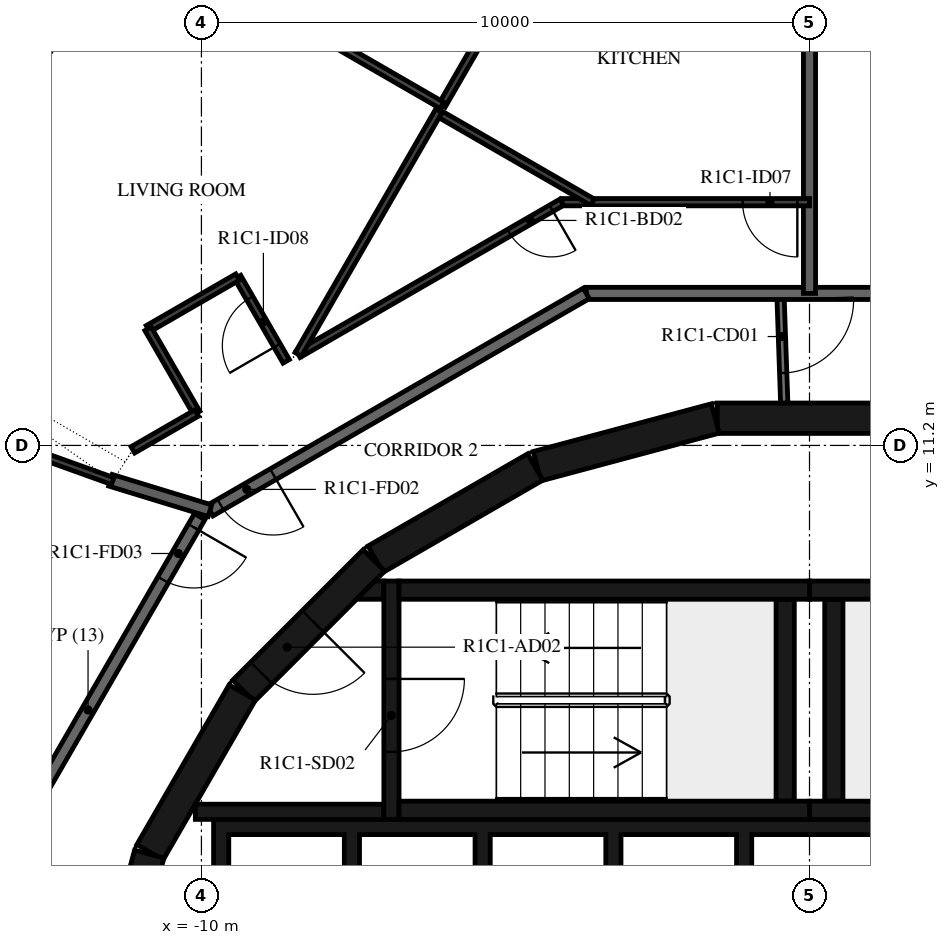
"""IFC4 building model, lengths in metres.
Left out: names, types, materials, properties, quantities, classifications, styles, units other than length and angle.
Written with IfcOpenShell. Run it as: python <this file> out.ifc"""

import sys

from ifc_helpers import new_model, si_unit, direction, frame, frame_2d, origin, place, context, subcontext, project, spatial, polyline, rectangle, outline, extrude, element, fill, save


model = new_model("IFC4")
c1 = context("Model", 3, precision=1e-05, world=origin(), true_north=direction((0.0, 1.0)))
c2 = subcontext(c1, "Body", "Model", "MODEL_VIEW")
j1 = project(units=[si_unit("LENGTHUNIT", "METRE"), si_unit("PLANEANGLEUNIT", "RADIAN")], contexts=[c1])
p1 = place(None, origin())
s1 = spatial("IfcSite", under=j1, at=p1, CompositionType="ELEMENT")
p2 = place(p1, origin())
s2 = spatial("IfcBuilding", under=s1, at=p2, CompositionType="ELEMENT")
p3 = place(p2, frame((0.0, 0.0, 62.9)))
s3 = spatial("IfcBuildingStorey", under=s2, at=p3, CompositionType="ELEMENT", Elevation=62.9)
for number, where, z_axis, x_axis in (
    (1, (1.516, 11.647, 0.0), (0.0, 0.0, 1.0), (-1.0, 0.0, 0.0)),
    (2, (-1.55, 11.643, 0.0), (0.0, 0.0, 1.0), (-0.966, -0.259, 0.0)),
    (3, (-4.51, 10.845, 0.0), (0.0, 0.0, 1.0), (-0.866, -0.5, 0.0)),
):
    element("IfcWall", number, at=place(p3, frame(where, z_axis=z_axis, x_axis=x_axis)), inside=s3, PredefinedType="SHEAR", context=c2, shape_type="SweptSolid", body=[
        extrude(rectangle(XDim=3.033, YDim=0.5, at=frame_2d((1.516, 0.0))), origin(), (0.0, 0.0, 1.0), 3.12),
    ])
p4 = place(p3, frame((-7.164, 9.308, 0.0), z_axis=(0.0, 0.0, 1.0), x_axis=(-0.707106781187, -0.707106781187, 0.0)))
e4 = element("IfcWall", 4, at=p4, inside=s3, PredefinedType="SHEAR", context=c2, shape_type="SweptSolid", body=[
    extrude(rectangle(XDim=3.032, YDim=0.5, at=frame_2d((1.516, 0.0))), origin(), (0.0, 0.0, 1.0), 3.12),
])
p5 = place(p4, frame((1.416, 0.0, 0.0)))
e5 = element("IfcOpeningElement", 5, at=p5, cuts=e4, PredefinedType="OPENING", context=c2, shape_type="SweptSolid", body=[
    extrude(rectangle(XDim=1.2, YDim=2.1, at=frame_2d((0.6, 1.05))), frame((0.0, 0.26, 0.0), z_axis=(0.0, -1.0, 0.0), x_axis=(1.0, 0.0, 0.0)), (0.0, 0.0, 1.0), 0.52),
])
for number, where, z_axis, x_axis in (
    (6, (-9.329, 7.137, 0.0), (0.0, 0.0, 1.0), (-0.5, -0.866, 0.0)),
    (7, (-10.858, 4.479, 0.0), (0.0, 0.0, 1.0), (-0.259, -0.966, 0.0)),
):
    element("IfcWall", number, at=place(p3, frame(where, z_axis=z_axis, x_axis=x_axis)), inside=s3, PredefinedType="SHEAR", context=c2, shape_type="SweptSolid", body=[
        extrude(rectangle(XDim=3.033, YDim=0.5, at=frame_2d((1.516, 0.0))), origin(), (0.0, 0.0, 1.0), 3.12),
    ])
for number, where, z_axis, x_axis in (
    (8, (0.0, 5.2, 0.0), (0.0, 0.0, 1.0), (1.0, 0.0, 0.0)),
    (9, (0.0, 8.82, 0.0), (0.0, 0.0, 1.0), (1.0, 0.0, 0.0)),
):
    element("IfcWall", number, at=place(p3, frame(where, z_axis=z_axis, x_axis=x_axis)), inside=s3, PredefinedType="SHEAR", context=c2, shape_type="SweptSolid", body=[
        extrude(rectangle(XDim=6.75, YDim=0.3, at=frame_2d((3.375, 0.0))), origin(), (0.0, 0.0, 1.0), 3.12),
    ])
p6 = place(p3, frame((0.4, 5.35, 0.0), z_axis=(0.0, 0.0, 1.0), x_axis=(0.0, 1.0, 0.0)))
e10 = element("IfcWall", 10, at=p6, inside=s3, PredefinedType="SHEAR", context=c2, shape_type="SweptSolid", body=[
    extrude(rectangle(XDim=3.32, YDim=0.3, at=frame_2d((1.66, 0.0))), origin(), (0.0, 0.0, 1.0), 3.12),
])
for number, where, z_axis, x_axis in (
    (11, (-6.75, 5.2, 0.0), (0.0, 0.0, 1.0), (1.0, 0.0, 0.0)),
    (12, (-6.75, 8.82, 0.0), (0.0, 0.0, 1.0), (1.0, 0.0, 0.0)),
):
    element("IfcWall", number, at=place(p3, frame(where, z_axis=z_axis, x_axis=x_axis)), inside=s3, PredefinedType="SHEAR", context=c2, shape_type="SweptSolid", body=[
        extrude(rectangle(XDim=6.75, YDim=0.3, at=frame_2d((3.375, 0.0))), origin(), (0.0, 0.0, 1.0), 3.12),
    ])
p7 = place(p3, frame((-0.4, 5.35, 0.0), z_axis=(0.0, 0.0, 1.0), x_axis=(0.0, 1.0, 0.0)))
e13 = element("IfcWall", 13, at=p7, inside=s3, PredefinedType="SHEAR", context=c2, shape_type="SweptSolid", body=[
    extrude(rectangle(XDim=3.32, YDim=0.3, at=frame_2d((1.66, 0.0))), origin(), (0.0, 0.0, 1.0), 3.12),
])
p8 = place(p3, frame((-6.875, 8.97, 0.0), z_axis=(0.0, 0.0, 1.0), x_axis=(0.0, -1.0, 0.0)))
e14 = element("IfcWall", 14, at=p8, inside=s3, PredefinedType="SHEAR", context=c2, shape_type="SweptSolid", body=[
    extrude(rectangle(XDim=3.92, YDim=0.25, at=frame_2d((1.96, 0.0))), origin(), (0.0, 0.0, 1.0), 3.12),
])
p9 = place(p8, frame((1.61, 0.0, 0.0)))
e15 = element("IfcOpeningElement", 15, at=p9, cuts=e14, PredefinedType="OPENING", context=c2, shape_type="SweptSolid", body=[
    extrude(rectangle(XDim=1.2, YDim=2.1, at=frame_2d((0.6, 1.05))), frame((0.0, 0.135, 0.0), z_axis=(0.0, -1.0, 0.0), x_axis=(1.0, 0.0, 0.0)), (0.0, 0.0, 1.0), 0.27),
])
p10 = place(p3, frame((-7.0, 5.175, 0.0), z_axis=(0.0, 0.0, 1.0), x_axis=(-1.0, 0.0, 0.0)))
e16 = element("IfcWall", 16, at=p10, inside=s3, PredefinedType="SHEAR", context=c2, shape_type="SweptSolid", body=[
    extrude(rectangle(XDim=3.1, YDim=0.25, at=frame_2d((1.55, 0.0))), origin(), (0.0, 0.0, 1.0), 3.12),
])
p11 = place(p3, origin())
e17 = element("IfcWall", 17, at=p11, inside=s3, PredefinedType="SHEAR", context=c2, shape_type="SweptSolid", body=[
    extrude(outline(polyline([(-7.148, 8.97), (-7.0, 8.97), (-7.0, 8.67), (-7.448, 8.67), (-7.148, 8.97)])), origin(), (0.0, 0.0, 1.0), 3.12),
])
p12 = place(p3, origin())
e18 = element("IfcWall", 18, at=p12, inside=s3, PredefinedType="SHEAR", context=c2, shape_type="SweptSolid", body=[
    extrude(outline(polyline([(-9.55, 4.8), (-7.65, 4.8), (-7.65, 1.9), (-7.4, 1.9), (-7.4, 4.8), (-5.5, 4.8), (-5.5, 1.9), (-5.25, 1.9), (-5.25, 4.8), (-3.35, 4.8), (-3.35, 1.9), (-3.1, 1.9), (-3.1, 4.8), (-1.2, 4.8), (-1.2, 1.9), (-0.95, 1.9), (-0.95, 4.8), (3.1, 4.8), (3.1, 1.9), (3.35, 1.9), (3.35, 4.8), (5.25, 4.8), (5.25, 1.9), (5.5, 1.9), (5.5, 4.8), (7.4, 4.8), (7.4, 1.9), (7.65, 1.9), (7.65, 4.8), (9.55, 4.8), (9.55, 1.9), (9.8, 1.9), (9.8, 4.8), (9.8, 5.05), (-9.8, 5.05), (-9.8, 4.8), (-9.8, 1.9), (-9.55, 1.9), (-9.55, 4.8)])), origin(), (0.0, 0.0, 1.0), 3.12),
])
p13 = place(p3, frame((-0.479, 13.7, 0.0), z_axis=(0.0, 0.0, 1.0), x_axis=(0.034919103017, -0.999390142159, 0.0)))
e19 = element("IfcWall", 19, at=p13, inside=s3, PredefinedType="PARTITIONING", context=c2, shape_type="SweptSolid", body=[
    extrude(rectangle(XDim=1.804, YDim=0.12, at=frame_2d((0.902, 0.0))), origin(), (0.0, 0.0, 1.0), 3.12),
])
p14 = place(p13, frame((0.11, 0.0, 0.0)))
e20 = element("IfcOpeningElement", 20, at=p14, cuts=e19, PredefinedType="OPENING", context=c2, shape_type="SweptSolid", body=[
    extrude(rectangle(XDim=1.2, YDim=2.1, at=frame_2d((0.6, 1.05))), frame((0.0, 0.07, 0.0), z_axis=(0.0, -1.0, 0.0), x_axis=(1.0, 0.0, 0.0)), (0.0, 0.0, 1.0), 0.14),
])
p15 = place(p3, frame((3.671, 13.7, 0.0), z_axis=(0.0, 0.0, 1.0), x_axis=(-1.0, 0.0, 0.0)))
e21 = element("IfcWall", 21, at=p15, inside=s3, PredefinedType="STANDARD", context=c2, shape_type="SweptSolid", body=[
    extrude(rectangle(XDim=7.342, YDim=0.2, at=frame_2d((3.671, 0.0))), origin(), (0.0, 0.0, 1.0), 3.12),
])
p16 = place(p3, frame((-3.671, 13.7, 0.0), z_axis=(0.0, 0.0, 1.0), x_axis=(-0.866031419417, -0.499989580474, 0.0)))
e22 = element("IfcWall", 22, at=p16, inside=s3, PredefinedType="STANDARD", context=c2, shape_type="SweptSolid", body=[
    extrude(rectangle(XDim=7.147, YDim=0.2, at=frame_2d((3.573, 0.0))), origin(), (0.0, 0.0, 1.0), 3.12),
])
p17 = place(p16, frame((5.947, 0.0, 0.0)))
e23 = element("IfcOpeningElement", 23, at=p17, cuts=e22, PredefinedType="OPENING", context=c2, shape_type="SweptSolid", body=[
    extrude(rectangle(XDim=1.0, YDim=2.1, at=frame_2d((0.5, 1.05))), frame((0.0, 0.11, 0.0), z_axis=(0.0, -1.0, 0.0), x_axis=(1.0, 0.0, 0.0)), (0.0, 0.0, 1.0), 0.22),
])
p18 = place(p3, frame((-10.029, 10.029, 0.0), z_axis=(0.0, 0.0, 1.0), x_axis=(-0.500001669485, -0.866024439905, 0.0)))
e24 = element("IfcWall", 24, at=p18, inside=s3, PredefinedType="STANDARD", context=c2, shape_type="SweptSolid", body=[
    extrude(rectangle(XDim=7.342, YDim=0.2, at=frame_2d((3.671, 0.0))), origin(), (0.0, 0.0, 1.0), 3.12),
])
p19 = place(p18, frame((0.2, 0.0, 0.0)))
e25 = element("IfcOpeningElement", 25, at=p19, cuts=e24, PredefinedType="OPENING", context=c2, shape_type="SweptSolid", body=[
    extrude(rectangle(XDim=1.0, YDim=2.1, at=frame_2d((0.5, 1.05))), frame((0.0, 0.11, 0.0), z_axis=(0.0, -1.0, 0.0), x_axis=(1.0, 0.0, 0.0)), (0.0, 0.0, 1.0), 0.22),
])
p20 = place(p3, frame((0.0, 18.437, 0.0), z_axis=(0.0, 0.0, 1.0), x_axis=(0.0, -1.0, 0.0)))
e26 = element("IfcWall", 26, at=p20, inside=s3, PredefinedType="STANDARD", context=c2, shape_type="SweptSolid", body=[
    extrude(rectangle(XDim=4.737, YDim=0.2, at=frame_2d((2.368, 0.0))), origin(), (0.0, 0.0, 1.0), 3.12),
])
p21 = place(p3, frame((-11.496, 10.627, 0.0), z_axis=(0.0, 0.0, 1.0), x_axis=(0.956240708563, -0.292581112321, 0.0)))
e27 = element("IfcWall", 27, at=p21, inside=s3, PredefinedType="STANDARD", context=c2, shape_type="SweptSolid", body=[
    extrude(rectangle(XDim=1.711, YDim=0.2, at=frame_2d((0.855, 0.0))), origin(), (0.0, 0.0, 1.0), 3.12),
])
p22 = place(p3, frame((0.0, 15.2, 0.0), z_axis=(0.0, 0.0, 1.0), x_axis=(-1.0, 0.0, 0.0)))
e28 = element("IfcWall", 28, at=p22, inside=s3, PredefinedType="PARTITIONING", context=c2, shape_type="SweptSolid", body=[
    extrude(rectangle(XDim=4.073, YDim=0.12, at=frame_2d((2.036, 0.0))), origin(), (0.0, 0.0, 1.0), 3.12),
])
p23 = place(p22, frame((0.2, 0.0, 0.0)))
e29 = element("IfcOpeningElement", 29, at=p23, cuts=e28, PredefinedType="OPENING", context=c2, shape_type="SweptSolid", body=[
    extrude(rectangle(XDim=0.9, YDim=2.1, at=frame_2d((0.45, 1.05))), frame((0.0, 0.07, 0.0), z_axis=(0.0, -1.0, 0.0), x_axis=(1.0, 0.0, 0.0)), (0.0, 0.0, 1.0), 0.14),
])
p24 = place(p3, frame((-4.073, 15.2, 0.0), z_axis=(0.0, 0.0, 1.0), x_axis=(-0.866034514313, -0.499984219769, 0.0)))
e30 = element("IfcWall", 30, at=p24, inside=s3, PredefinedType="PARTITIONING", context=c2, shape_type="SweptSolid", body=[
    extrude(rectangle(XDim=5.006, YDim=0.12, at=frame_2d((2.503, 0.0))), origin(), (0.0, 0.0, 1.0), 3.12),
])
p25 = place(p24, frame((0.2, 0.0, 0.0)))
e31 = element("IfcOpeningElement", 31, at=p25, cuts=e30, PredefinedType="OPENING", context=c2, shape_type="SweptSolid", body=[
    extrude(rectangle(XDim=0.8, YDim=2.1, at=frame_2d((0.4, 1.05))), frame((0.0, 0.07, 0.0), z_axis=(0.0, -1.0, 0.0), x_axis=(1.0, 0.0, 0.0)), (0.0, 0.0, 1.0), 0.14),
])
p26 = place(p3, frame((-8.606, 12.583, 0.0), z_axis=(0.0, 0.0, 1.0), x_axis=(-0.499995408039, 0.866028054938, 0.0)))
e32 = element("IfcWall", 32, at=p26, inside=s3, PredefinedType="PARTITIONING", context=c2, shape_type="SweptSolid", body=[
    extrude(rectangle(XDim=1.6, YDim=0.12, at=frame_2d((0.8, 0.0))), origin(), (0.0, 0.0, 1.0), 3.12),
])
p27 = place(p26, frame((0.3, 0.0, 0.0)))
e33 = element("IfcOpeningElement", 33, at=p27, cuts=e32, PredefinedType="OPENING", context=c2, shape_type="SweptSolid", body=[
    extrude(rectangle(XDim=0.9, YDim=2.1, at=frame_2d((0.45, 1.05))), frame((0.0, 0.07, 0.0), z_axis=(0.0, -1.0, 0.0), x_axis=(1.0, 0.0, 0.0)), (0.0, 0.0, 1.0), 0.14),
])
p28 = place(p3, frame((-9.406, 13.969, 0.0), z_axis=(0.0, 0.0, 1.0), x_axis=(-0.865989465428, -0.500062241894, 0.0)))
e34 = element("IfcWall", 34, at=p28, inside=s3, PredefinedType="PARTITIONING", context=c2, shape_type="SweptSolid", body=[
    extrude(rectangle(XDim=1.7, YDim=0.12, at=frame_2d((0.85, 0.0))), origin(), (0.0, 0.0, 1.0), 3.12),
])
p29 = place(p3, frame((-10.878, 13.118, 0.0), z_axis=(0.0, 0.0, 1.0), x_axis=(0.500061482766, -0.865989903783, 0.0)))
e35 = element("IfcWall", 35, at=p29, inside=s3, PredefinedType="PARTITIONING", context=c2, shape_type="SweptSolid", body=[
    extrude(rectangle(XDim=1.6, YDim=0.12, at=frame_2d((0.8, 0.0))), origin(), (0.0, 0.0, 1.0), 3.12),
])
p30 = place(p3, frame((-10.078, 11.733, 0.0), z_axis=(0.0, 0.0, 1.0), x_axis=(-0.866014416983, -0.500019029215, 0.0)))
e36 = element("IfcWall", 36, at=p30, inside=s3, PredefinedType="PARTITIONING", context=c2, shape_type="SweptSolid", body=[
    extrude(rectangle(XDim=1.211, YDim=0.12, at=frame_2d((0.606, 0.0))), origin(), (0.0, 0.0, 1.0), 3.12),
])
p31 = place(p3, frame((-1.907, 23.957, 0.0), z_axis=(0.0, 0.0, 1.0), x_axis=(-0.499994901178, -0.866028347571, 0.0)))
e37 = element("IfcWall", 37, at=p31, inside=s3, PredefinedType="PARTITIONING", context=c2, shape_type="SweptSolid", body=[
    extrude(rectangle(XDim=8.274, YDim=0.12, at=frame_2d((4.137, 0.0))), origin(), (0.0, 0.0, 1.0), 3.12),
])
p32 = place(p31, frame((4.387, 0.0, 0.0)))
e38 = element("IfcOpeningElement", 38, at=p32, cuts=e37, PredefinedType="OPENING", context=c2, shape_type="SweptSolid", body=[
    extrude(rectangle(XDim=0.9, YDim=2.1, at=frame_2d((0.45, 1.05))), frame((0.0, 0.07, 0.0), z_axis=(0.0, -1.0, 0.0), x_axis=(1.0, 0.0, 0.0)), (0.0, 0.0, 1.0), 0.14),
])
p33 = place(p3, frame((-6.114, 16.67, 0.0), z_axis=(0.0, 0.0, 1.0), x_axis=(0.866011328839, -0.500024377727, 0.0)))
e39 = element("IfcWall", 39, at=p33, inside=s3, PredefinedType="PARTITIONING", context=c2, shape_type="SweptSolid", body=[
    extrude(rectangle(XDim=2.94, YDim=0.12, at=frame_2d((1.47, 0.0))), origin(), (0.0, 0.0, 1.0), 3.12),
])
p34 = place(p3, frame((-11.24, 19.792, 0.0), z_axis=(0.0, 0.0, 1.0), x_axis=(0.866031096941, -0.499990139034, 0.0)))
e40 = element("IfcWall", 40, at=p34, inside=s3, PredefinedType="PARTITIONING", context=c2, shape_type="SweptSolid", body=[
    extrude(rectangle(XDim=6.0, YDim=0.12, at=frame_2d((3.0, 0.0))), origin(), (0.0, 0.0, 1.0), 2.73),
])
p35 = place(p3, frame((-6.094, 16.705, 0.0), z_axis=(0.0, 0.0, 1.0), x_axis=(-0.500014747178, -0.86601688933, 0.0)))
e41 = element("IfcWall", 41, at=p35, inside=s3, PredefinedType="PARTITIONING", context=c2, shape_type="SweptSolid", body=[
    extrude(rectangle(XDim=4.627, YDim=0.12, at=frame_2d((2.313, 0.0))), origin(), (0.0, 0.0, 1.0), 3.12),
])
p36 = place(p3, frame((-11.458, 10.614, 0.0), z_axis=(0.0, 0.0, 1.0), x_axis=(-0.941092440198, 0.338149403375, 0.0)))
e42 = element("IfcWall", 42, at=p36, inside=s3, PredefinedType="PARTITIONING", context=c2, shape_type="SweptSolid", body=[
    extrude(rectangle(XDim=2.123, YDim=0.12, at=frame_2d((1.062, 0.0))), origin(), (0.0, 0.0, 1.0), 3.12),
])
p37 = place(p9, origin())
e43 = element("IfcDoor", 43, at=p37, inside=s3, OperationType="SINGLE_SWING_LEFT", PredefinedType="DOOR", context=c2, shape_type="SweptSolid", body=[
    extrude(rectangle(XDim=1.2, YDim=2.1, at=frame_2d((0.6, 1.05))), frame((0.0, 0.025, 0.0), z_axis=(0.0, -1.0, 0.0), x_axis=(1.0, 0.0, 0.0)), (0.0, 0.0, 1.0), 0.05),
])
fill(e15, e43)
p38 = place(p5, origin())
e44 = element("IfcDoor", 44, at=p38, inside=s3, OperationType="SINGLE_SWING_RIGHT", PredefinedType="DOOR", context=c2, shape_type="SweptSolid", body=[
    extrude(rectangle(XDim=1.2, YDim=2.1, at=frame_2d((0.6, 1.05))), frame((0.0, 0.025, 0.0), z_axis=(0.0, -1.0, 0.0), x_axis=(1.0, 0.0, 0.0)), (0.0, 0.0, 1.0), 0.05),
])
fill(e5, e44)
p39 = place(p17, origin())
e45 = element("IfcDoor", 45, at=p39, inside=s3, OperationType="SINGLE_SWING_LEFT", PredefinedType="DOOR", context=c2, shape_type="SweptSolid", body=[
    extrude(rectangle(XDim=1.0, YDim=2.1, at=frame_2d((0.5, 1.05))), frame((0.0, 0.025, 0.0), z_axis=(0.0, -1.0, 0.0), x_axis=(1.0, 0.0, 0.0)), (0.0, 0.0, 1.0), 0.05),
])
fill(e23, e45)
p40 = place(p23, origin())
e46 = element("IfcDoor", 46, at=p40, inside=s3, OperationType="SINGLE_SWING_RIGHT", PredefinedType="DOOR", context=c2, shape_type="SweptSolid", body=[
    extrude(rectangle(XDim=0.9, YDim=2.1, at=frame_2d((0.45, 1.05))), frame((0.0, 0.025, 0.0), z_axis=(0.0, -1.0, 0.0), x_axis=(1.0, 0.0, 0.0)), (0.0, 0.0, 1.0), 0.05),
])
fill(e29, e46)
p41 = place(p25, origin())
e47 = element("IfcDoor", 47, at=p41, inside=s3, OperationType="SINGLE_SWING_LEFT", PredefinedType="DOOR", context=c2, shape_type="SweptSolid", body=[
    extrude(rectangle(XDim=0.8, YDim=2.1, at=frame_2d((0.4, 1.05))), frame((0.0, 0.025, 0.0), z_axis=(0.0, -1.0, 0.0), x_axis=(1.0, 0.0, 0.0)), (0.0, 0.0, 1.0), 0.05),
])
fill(e31, e47)
p42 = place(p27, origin())
e48 = element("IfcDoor", 48, at=p42, inside=s3, OperationType="SINGLE_SWING_RIGHT", PredefinedType="DOOR", context=c2, shape_type="SweptSolid", body=[
    extrude(rectangle(XDim=0.9, YDim=2.1, at=frame_2d((0.45, 1.05))), frame((0.0, 0.025, 0.0), z_axis=(0.0, -1.0, 0.0), x_axis=(1.0, 0.0, 0.0)), (0.0, 0.0, 1.0), 0.05),
])
fill(e33, e48)
p43 = place(p19, origin())
e49 = element("IfcDoor", 49, at=p43, inside=s3, OperationType="SINGLE_SWING_LEFT", PredefinedType="DOOR", context=c2, shape_type="SweptSolid", body=[
    extrude(rectangle(XDim=1.0, YDim=2.1, at=frame_2d((0.5, 1.05))), frame((0.0, 0.025, 0.0), z_axis=(0.0, -1.0, 0.0), x_axis=(1.0, 0.0, 0.0)), (0.0, 0.0, 1.0), 0.05),
])
fill(e25, e49)
p44 = place(p14, origin())
e50 = element("IfcDoor", 50, at=p44, inside=s3, OperationType="DOUBLE_DOOR_SINGLE_SWING", PredefinedType="DOOR", context=c2, shape_type="SweptSolid", body=[
    extrude(rectangle(XDim=1.2, YDim=2.1, at=frame_2d((0.6, 1.05))), frame((0.0, 0.025, 0.0), z_axis=(0.0, -1.0, 0.0), x_axis=(1.0, 0.0, 0.0)), (0.0, 0.0, 1.0), 0.05),
])
fill(e20, e50)
save(model, sys.argv[1])
